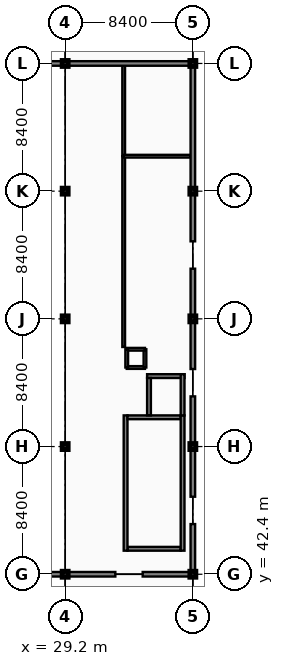
"""IFC4 building model, lengths in metres.
Left out: names, types, materials, properties, quantities, classifications, styles, units other than length and angle.
Written with IfcOpenShell. Run it as: python <this file> out.ifc"""

import sys

from ifc_helpers import new_model, si_unit, direction, frame, frame_2d, origin, origin_2d, place, context, subcontext, project, spatial, rectangle, extrude, element, fill, save


model = new_model("IFC4")
c1 = context("Model", 3, precision=1e-05, world=origin(), true_north=direction((0.0, 1.0)))
c2 = subcontext(c1, "Body", "Model", "MODEL_VIEW")
j1 = project(units=[si_unit("LENGTHUNIT", "METRE"), si_unit("PLANEANGLEUNIT", "RADIAN")], contexts=[c1])
p1 = place(None, origin())
s1 = spatial("IfcSite", under=j1, at=p1, CompositionType="ELEMENT")
p2 = place(p1, origin())
s2 = spatial("IfcBuilding", under=s1, at=p2, CompositionType="ELEMENT")
p3 = place(p2, frame((0.0, 0.0, 5.4)))
s3 = spatial("IfcBuildingStorey", under=s2, at=p3, CompositionType="ELEMENT", Elevation=5.4)
for number, where, z_axis, x_axis in (
    (1, (29.2, 42.4, 0.0), (0.0, 0.0, 1.0), (1.0, 0.0, 0.0)),
    (2, (29.2, 50.8, 0.0), (0.0, 0.0, 1.0), (1.0, 0.0, 0.0)),
    (3, (29.2, 59.2, 0.0), (0.0, 0.0, 1.0), (1.0, 0.0, 0.0)),
    (4, (29.2, 67.6, 0.0), (0.0, 0.0, 1.0), (1.0, 0.0, 0.0)),
    (5, (29.2, 76.0, 0.0), (0.0, 0.0, 1.0), (1.0, 0.0, 0.0)),
    (6, (37.6, 42.4, 0.0), (0.0, 0.0, 1.0), (1.0, 0.0, 0.0)),
    (7, (37.6, 50.8, 0.0), (0.0, 0.0, 1.0), (1.0, 0.0, 0.0)),
    (8, (37.6, 59.2, 0.0), (0.0, 0.0, 1.0), (1.0, 0.0, 0.0)),
    (9, (37.6, 67.6, 0.0), (0.0, 0.0, 1.0), (1.0, 0.0, 0.0)),
    (10, (37.6, 76.0, 0.0), (0.0, 0.0, 1.0), (1.0, 0.0, 0.0)),
):
    element("IfcColumn", number, at=place(p3, frame(where, z_axis=z_axis, x_axis=x_axis)), inside=s3, PredefinedType="COLUMN", context=c2, shape_type="SweptSolid", body=[
        extrude(rectangle(XDim=0.4, YDim=0.4, at=origin_2d()), origin(), (0.0, 0.0, 1.0), 4.2),
    ])
p4 = place(p3, frame((33.05, 57.35, 0.0), z_axis=(0.0, 0.0, 1.0), x_axis=(0.0, 1.0, 0.0)))
e11 = element("IfcWall", 11, at=p4, inside=s3, PredefinedType="PARTITIONING", context=c2, shape_type="SweptSolid", body=[
    extrude(rectangle(XDim=12.55, YDim=0.18, at=frame_2d((6.275, 0.0))), origin(), (0.0, 0.0, 1.0), 3.25),
])
p5 = place(p4, frame((5.775, 0.0, -0.01)))
e12 = element("IfcOpeningElement", 12, at=p5, cuts=e11, PredefinedType="OPENING", context=c2, shape_type="SweptSolid", body=[
    extrude(rectangle(XDim=1.0, YDim=2.16, at=frame_2d((0.5, 1.08))), frame((0.0, 0.1, 0.0), z_axis=(0.0, -1.0, 0.0), x_axis=(1.0, 0.0, 0.0)), (0.0, 0.0, 1.0), 0.2),
])
p6 = place(p3, frame((33.05, 69.9, 0.0), z_axis=(0.0, 0.0, 1.0), x_axis=(0.0, 1.0, 0.0)))
e13 = element("IfcWall", 13, at=p6, inside=s3, PredefinedType="PARTITIONING", context=c2, shape_type="SweptSolid", body=[
    extrude(rectangle(XDim=5.96, YDim=0.18, at=frame_2d((2.98, 0.0))), origin(), (0.0, 0.0, 1.0), 3.52),
])
p7 = place(p6, frame((2.48, 0.0, -0.01)))
e14 = element("IfcOpeningElement", 14, at=p7, cuts=e13, PredefinedType="OPENING", context=c2, shape_type="SweptSolid", body=[
    extrude(rectangle(XDim=1.0, YDim=2.16, at=frame_2d((0.5, 1.08))), frame((0.0, 0.1, 0.0), z_axis=(0.0, -1.0, 0.0), x_axis=(1.0, 0.0, 0.0)), (0.0, 0.0, 1.0), 0.2),
])
p8 = place(p3, frame((33.05, 69.9, 0.0), z_axis=(0.0, 0.0, 1.0), x_axis=(1.0, 0.0, 0.0)))
e15 = element("IfcWall", 15, at=p8, inside=s3, PredefinedType="PARTITIONING", context=c2, shape_type="SweptSolid", body=[
    extrude(rectangle(XDim=4.41, YDim=0.18, at=frame_2d((2.205, 0.0))), origin(), (0.0, 0.0, 1.0), 3.52),
])
for number, where, z_axis, x_axis in (
    (16, (25.9, 42.4, 0.0), (0.0, 0.0, 1.0), (1.0, 0.0, 0.0)),
    (17, (29.2, 42.4, 0.0), (0.0, 0.0, 1.0), (1.0, 0.0, 0.0)),
    (18, (34.3, 42.4, 0.0), (0.0, 0.0, 1.0), (1.0, 0.0, 0.0)),
):
    element("IfcWall", number, at=place(p3, frame(where, z_axis=z_axis, x_axis=x_axis)), inside=s3, PredefinedType="SOLIDWALL", context=c2, shape_type="SweptSolid", body=[
        extrude(rectangle(XDim=3.3, YDim=0.3, at=frame_2d((1.65, 0.0))), origin(), (0.0, 0.0, 1.0), 3.21),
    ])
p9 = place(p3, frame((29.2, 76.0, 0.0), z_axis=(0.0, 0.0, 1.0), x_axis=(-1.0, 0.0, 0.0)))
e19 = element("IfcWall", 19, at=p9, inside=s3, PredefinedType="SOLIDWALL", context=c2, shape_type="SweptSolid", body=[
    extrude(rectangle(XDim=3.3, YDim=0.3, at=frame_2d((1.65, 0.0))), origin(), (0.0, 0.0, 1.0), 3.15),
])
p10 = place(p3, frame((37.6, 76.0, 0.0), z_axis=(0.0, 0.0, 1.0), x_axis=(-1.0, 0.0, 0.0)))
e20 = element("IfcWall", 20, at=p10, inside=s3, PredefinedType="SOLIDWALL", context=c2, shape_type="SweptSolid", body=[
    extrude(rectangle(XDim=8.4, YDim=0.3, at=frame_2d((4.2, 0.0))), origin(), (0.0, 0.0, 1.0), 3.15),
])
p11 = place(p10, frame((2.52, 0.0, -0.01)))
e21 = element("IfcOpeningElement", 21, at=p11, cuts=e20, PredefinedType="OPENING", context=c2, shape_type="SweptSolid", body=[
    extrude(rectangle(XDim=1.2, YDim=2.21, at=frame_2d((0.6, 1.105))), frame((0.0, 0.16, 0.0), z_axis=(0.0, -1.0, 0.0), x_axis=(1.0, 0.0, 0.0)), (0.0, 0.0, 1.0), 0.32),
])
for number, where, z_axis, x_axis in (
    (22, (37.6, 42.4, 0.0), (0.0, 0.0, 1.0), (0.0, 1.0, 0.0)),
    (23, (37.6, 47.5, 0.0), (0.0, 0.0, 1.0), (0.0, 1.0, 0.0)),
):
    element("IfcWall", number, at=place(p3, frame(where, z_axis=z_axis, x_axis=x_axis)), inside=s3, PredefinedType="SOLIDWALL", context=c2, shape_type="SweptSolid", body=[
        extrude(rectangle(XDim=3.3, YDim=0.3, at=frame_2d((1.65, 0.0))), origin(), (0.0, 0.0, 1.0), 3.21),
    ])
for number, where, z_axis, x_axis in (
    (24, (37.6, 50.8, 0.0), (0.0, 0.0, 1.0), (0.0, 1.0, 0.0)),
    (25, (37.6, 55.9, 0.0), (0.0, 0.0, 1.0), (0.0, 1.0, 0.0)),
    (26, (37.6, 59.2, 0.0), (0.0, 0.0, 1.0), (0.0, 1.0, 0.0)),
    (27, (37.6, 64.3, 0.0), (0.0, 0.0, 1.0), (0.0, 1.0, 0.0)),
):
    element("IfcWall", number, at=place(p3, frame(where, z_axis=z_axis, x_axis=x_axis)), inside=s3, PredefinedType="SOLIDWALL", context=c2, shape_type="SweptSolid", body=[
        extrude(rectangle(XDim=3.3, YDim=0.3, at=frame_2d((1.65, 0.0))), origin(), (0.0, 0.0, 1.0), 3.25),
    ])
p12 = place(p3, frame((37.6, 67.6, 0.0), z_axis=(0.0, 0.0, 1.0), x_axis=(0.0, 1.0, 0.0)))
e28 = element("IfcWall", 28, at=p12, inside=s3, PredefinedType="SOLIDWALL", context=c2, shape_type="SweptSolid", body=[
    extrude(rectangle(XDim=8.4, YDim=0.3, at=frame_2d((4.2, 0.0))), origin(), (0.0, 0.0, 1.0), 3.15),
])
p13 = place(p12, frame((0.46, 0.0, 0.85)))
e29 = element("IfcOpeningElement", 29, at=p13, cuts=e28, PredefinedType="OPENING", context=c2, shape_type="SweptSolid", body=[
    extrude(rectangle(XDim=0.9, YDim=2.15, at=frame_2d((0.45, 1.075))), frame((0.0, 0.16, 0.0), z_axis=(0.0, -1.0, 0.0), x_axis=(1.0, 0.0, 0.0)), (0.0, 0.0, 1.0), 0.32),
])
p14 = place(p12, frame((6.86, 0.0, 0.85)))
e30 = element("IfcOpeningElement", 30, at=p14, cuts=e28, PredefinedType="OPENING", context=c2, shape_type="SweptSolid", body=[
    extrude(rectangle(XDim=0.9, YDim=2.15, at=frame_2d((0.45, 1.075))), frame((0.0, 0.16, 0.0), z_axis=(0.0, -1.0, 0.0), x_axis=(1.0, 0.0, 0.0)), (0.0, 0.0, 1.0), 0.32),
])
p15 = place(p3, frame((33.3, 44.075, 0.0), z_axis=(0.0, 0.0, 1.0), x_axis=(1.0, 0.0, 0.0)))
e31 = element("IfcWall", 31, at=p15, inside=s3, PredefinedType="SHEAR", context=c2, shape_type="SweptSolid", body=[
    extrude(rectangle(XDim=3.5, YDim=0.25, at=frame_2d((1.75, 0.0))), origin(), (0.0, 0.0, 1.0), 4.2),
])
p16 = place(p15, frame((1.1, 0.0, -0.01)))
e32 = element("IfcOpeningElement", 32, at=p16, cuts=e31, PredefinedType="OPENING", context=c2, shape_type="SweptSolid", body=[
    extrude(rectangle(XDim=1.3, YDim=2.16, at=frame_2d((0.65, 1.08))), frame((0.0, 0.135, 0.0), z_axis=(0.0, -1.0, 0.0), x_axis=(1.0, 0.0, 0.0)), (0.0, 0.0, 1.0), 0.27),
])
p17 = place(p3, frame((33.175, 43.95, 0.0), z_axis=(0.0, 0.0, 1.0), x_axis=(0.0, 1.0, 0.0)))
e33 = element("IfcWall", 33, at=p17, inside=s3, PredefinedType="SHEAR", context=c2, shape_type="SweptSolid", body=[
    extrude(rectangle(XDim=8.9, YDim=0.25, at=frame_2d((4.45, 0.0))), origin(), (0.0, 0.0, 1.0), 4.2),
])
p18 = place(p3, frame((36.8, 52.725, 0.0), z_axis=(0.0, 0.0, 1.0), x_axis=(-1.0, 0.0, 0.0)))
e34 = element("IfcWall", 34, at=p18, inside=s3, PredefinedType="SHEAR", context=c2, shape_type="SweptSolid", body=[
    extrude(rectangle(XDim=3.5, YDim=0.25, at=frame_2d((1.75, 0.0))), origin(), (0.0, 0.0, 1.0), 4.2),
])
p19 = place(p3, frame((36.925, 43.95, 0.0), z_axis=(0.0, 0.0, 1.0), x_axis=(0.0, 1.0, 0.0)))
e35 = element("IfcWall", 35, at=p19, inside=s3, PredefinedType="SHEAR", context=c2, shape_type="SweptSolid", body=[
    extrude(rectangle(XDim=8.9, YDim=0.25, at=frame_2d((4.45, 0.0))), origin(), (0.0, 0.0, 1.0), 4.2),
])
p20 = place(p3, frame((34.59, 55.435, 0.0), z_axis=(0.0, 0.0, 1.0), x_axis=(1.0, 0.0, 0.0)))
e36 = element("IfcWall", 36, at=p20, inside=s3, PredefinedType="SHEAR", context=c2, shape_type="SweptSolid", body=[
    extrude(rectangle(XDim=2.46, YDim=0.25, at=frame_2d((1.23, 0.0))), origin(), (0.0, 0.0, 1.0), 4.2),
])
p21 = place(p3, frame((34.715, 52.85, 0.0), z_axis=(0.0, 0.0, 1.0), x_axis=(0.0, 1.0, 0.0)))
e37 = element("IfcWall", 37, at=p21, inside=s3, PredefinedType="SHEAR", context=c2, shape_type="SweptSolid", body=[
    extrude(rectangle(XDim=2.46, YDim=0.25, at=frame_2d((1.23, 0.0))), origin(), (0.0, 0.0, 1.0), 4.2),
])
p22 = place(p21, frame((0.68, 0.0, -0.01)))
e38 = element("IfcOpeningElement", 38, at=p22, cuts=e37, PredefinedType="OPENING", context=c2, shape_type="SweptSolid", body=[
    extrude(rectangle(XDim=1.1, YDim=2.16, at=frame_2d((0.55, 1.08))), frame((0.0, 0.135, 0.0), z_axis=(0.0, -1.0, 0.0), x_axis=(1.0, 0.0, 0.0)), (0.0, 0.0, 1.0), 0.27),
])
p23 = place(p3, frame((36.925, 52.85, 0.0), z_axis=(0.0, 0.0, 1.0), x_axis=(0.0, 1.0, 0.0)))
e39 = element("IfcWall", 39, at=p23, inside=s3, PredefinedType="SHEAR", context=c2, shape_type="SweptSolid", body=[
    extrude(rectangle(XDim=2.71, YDim=0.25, at=frame_2d((1.355, 0.0))), origin(), (0.0, 0.0, 1.0), 4.2),
])
for number, where, z_axis, x_axis in (
    (40, (33.25, 56.0, 0.0), (0.0, 0.0, 1.0), (1.0, 0.0, 0.0)),
    (41, (34.45, 56.0, 0.0), (0.0, 0.0, 1.0), (0.0, 1.0, 0.0)),
    (42, (34.45, 57.2, 0.0), (0.0, 0.0, 1.0), (-1.0, 0.0, 0.0)),
):
    element("IfcWall", number, at=place(p3, frame(where, z_axis=z_axis, x_axis=x_axis)), inside=s3, PredefinedType="SOLIDWALL", context=c2, shape_type="SweptSolid", body=[
        extrude(rectangle(XDim=1.2, YDim=0.18, at=frame_2d((0.6, 0.0))), origin(), (0.0, 0.0, 1.0), 3.97),
    ])
p24 = place(p3, frame((33.25, 57.2, 0.0), z_axis=(0.0, 0.0, 1.0), x_axis=(0.0, -1.0, 0.0)))
e43 = element("IfcWall", 43, at=p24, inside=s3, PredefinedType="SOLIDWALL", context=c2, shape_type="SweptSolid", body=[
    extrude(rectangle(XDim=1.2, YDim=0.18, at=frame_2d((0.6, 0.0))), origin(), (0.0, 0.0, 1.0), 3.97),
])
p25 = place(p24, frame((0.2, 0.0, -0.01)))
e44 = element("IfcOpeningElement", 44, at=p25, cuts=e43, PredefinedType="OPENING", context=c2, shape_type="SweptSolid", body=[
    extrude(rectangle(XDim=0.8, YDim=2.06, at=frame_2d((0.4, 1.03))), frame((0.0, 0.1, 0.0), z_axis=(0.0, -1.0, 0.0), x_axis=(1.0, 0.0, 0.0)), (0.0, 0.0, 1.0), 0.2),
])
p26 = place(p5, frame((0.0, 0.0, 0.01)))
e45 = element("IfcDoor", 45, at=p26, inside=s3, OperationType="SINGLE_SWING_RIGHT", PredefinedType="DOOR", context=c2, shape_type="SweptSolid", body=[
    extrude(rectangle(XDim=1.0, YDim=2.15, at=frame_2d((0.5, 1.075))), frame((0.0, 0.025, 0.0), z_axis=(0.0, -1.0, 0.0), x_axis=(1.0, 0.0, 0.0)), (0.0, 0.0, 1.0), 0.05),
])
fill(e12, e45)
p27 = place(p7, frame((0.0, 0.0, 0.01)))
e46 = element("IfcDoor", 46, at=p27, inside=s3, OperationType="SINGLE_SWING_LEFT", PredefinedType="DOOR", context=c2, shape_type="SweptSolid", body=[
    extrude(rectangle(XDim=1.0, YDim=2.15, at=frame_2d((0.5, 1.075))), frame((0.0, 0.025, 0.0), z_axis=(0.0, -1.0, 0.0), x_axis=(1.0, 0.0, 0.0)), (0.0, 0.0, 1.0), 0.05),
])
fill(e14, e46)
p28 = place(p11, frame((0.0, 0.0, 0.01)))
e47 = element("IfcDoor", 47, at=p28, inside=s3, OperationType="SINGLE_SWING_LEFT", PredefinedType="DOOR", context=c2, shape_type="SweptSolid", body=[
    extrude(rectangle(XDim=1.2, YDim=2.2, at=frame_2d((0.6, 1.1))), frame((0.0, 0.025, 0.0), z_axis=(0.0, -1.0, 0.0), x_axis=(1.0, 0.0, 0.0)), (0.0, 0.0, 1.0), 0.05),
])
fill(e21, e47)
p29 = place(p13, origin())
e48 = element("IfcWindow", 48, at=p29, inside=s3, PartitioningType="SINGLE_PANEL", PredefinedType="WINDOW", context=c2, shape_type="SweptSolid", body=[
    extrude(rectangle(XDim=0.9, YDim=2.15, at=frame_2d((0.45, 1.075))), frame((0.0, 0.03, 0.0), z_axis=(0.0, -1.0, 0.0), x_axis=(1.0, 0.0, 0.0)), (0.0, 0.0, 1.0), 0.06),
])
fill(e29, e48)
p30 = place(p14, origin())
e49 = element("IfcWindow", 49, at=p30, inside=s3, PartitioningType="SINGLE_PANEL", PredefinedType="WINDOW", context=c2, shape_type="SweptSolid", body=[
    extrude(rectangle(XDim=0.9, YDim=2.15, at=frame_2d((0.45, 1.075))), frame((0.0, 0.03, 0.0), z_axis=(0.0, -1.0, 0.0), x_axis=(1.0, 0.0, 0.0)), (0.0, 0.0, 1.0), 0.06),
])
fill(e30, e49)
p31 = place(p16, frame((0.0, 0.0, 0.01)))
e50 = element("IfcDoor", 50, at=p31, inside=s3, OperationType="SINGLE_SWING_RIGHT", PredefinedType="DOOR", context=c2, shape_type="SweptSolid", body=[
    extrude(rectangle(XDim=1.3, YDim=2.15, at=frame_2d((0.65, 1.075))), frame((0.0, 0.025, 0.0), z_axis=(0.0, -1.0, 0.0), x_axis=(1.0, 0.0, 0.0)), (0.0, 0.0, 1.0), 0.05),
])
fill(e32, e50)
p32 = place(p22, frame((0.0, 0.0, 0.01)))
e51 = element("IfcDoor", 51, at=p32, inside=s3, OperationType="SLIDING_TO_LEFT", PredefinedType="DOOR", context=c2, shape_type="SweptSolid", body=[
    extrude(rectangle(XDim=1.1, YDim=2.15, at=frame_2d((0.55, 1.075))), frame((0.0, 0.025, 0.0), z_axis=(0.0, -1.0, 0.0), x_axis=(1.0, 0.0, 0.0)), (0.0, 0.0, 1.0), 0.05),
])
fill(e38, e51)
p33 = place(p25, frame((0.0, 0.0, 0.01)))
e52 = element("IfcDoor", 52, at=p33, inside=s3, OperationType="SINGLE_SWING_LEFT", PredefinedType="DOOR", context=c2, shape_type="SweptSolid", body=[
    extrude(rectangle(XDim=0.8, YDim=2.05, at=frame_2d((0.4, 1.025))), frame((0.0, 0.025, 0.0), z_axis=(0.0, -1.0, 0.0), x_axis=(1.0, 0.0, 0.0)), (0.0, 0.0, 1.0), 0.05),
])
fill(e44, e52)
save(model, sys.argv[1])
